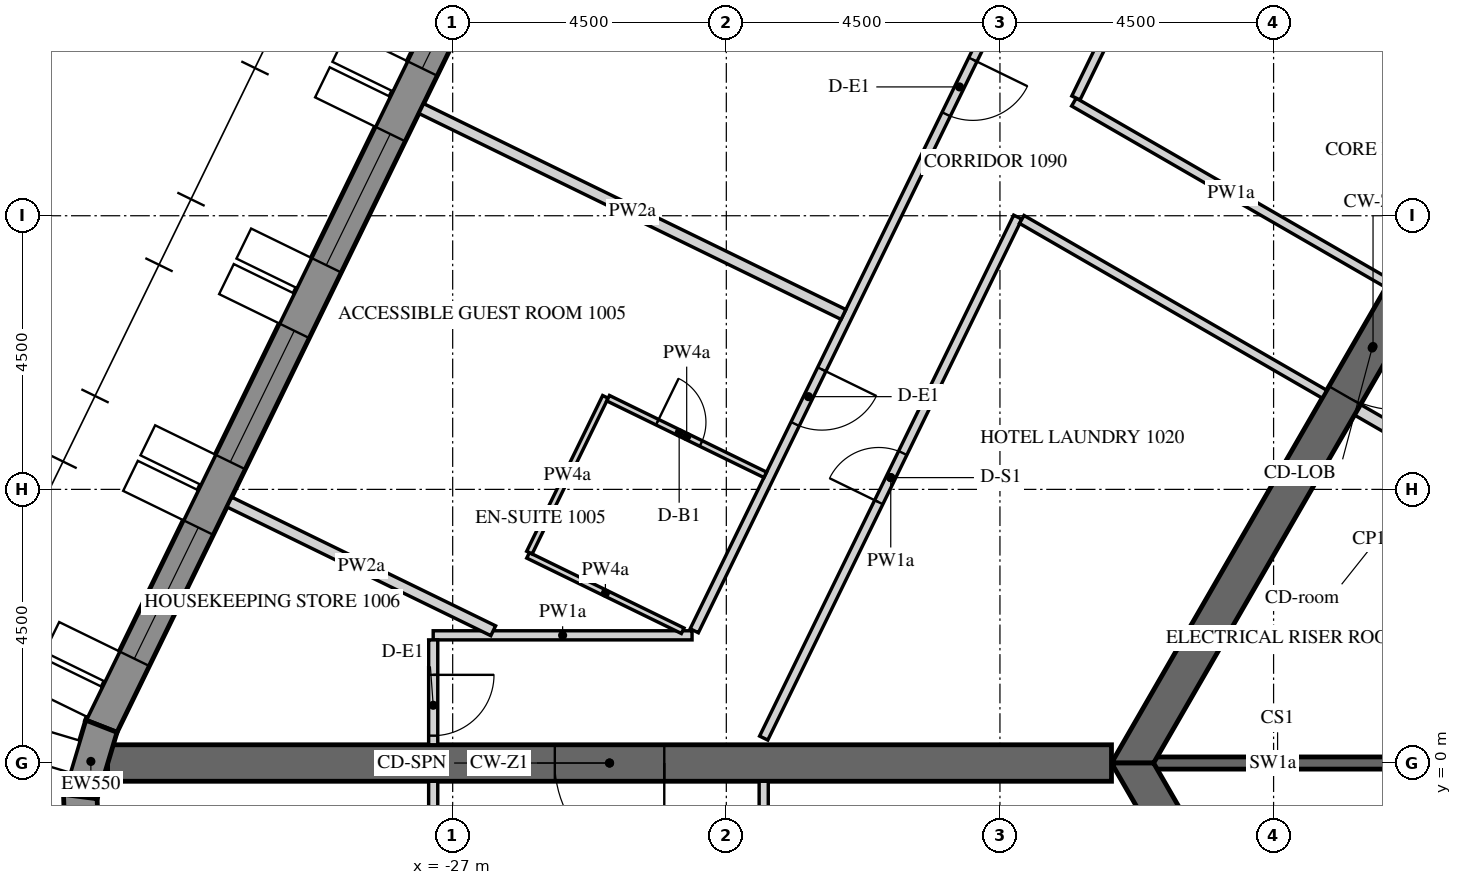
"""IFC4 building model, lengths in metres.
Left out: names, types, materials, properties, quantities, classifications, styles, units other than length and angle.
Written with IfcOpenShell. Run it as: python <this file> out.ifc"""

import sys

from ifc_helpers import new_model, si_unit, direction, frame, frame_2d, origin, place, context, subcontext, project, spatial, polyline, rectangle, outline, extrude, element, fill, save


model = new_model("IFC4")
c1 = context("Model", 3, precision=1e-05, world=origin(), true_north=direction((0.0, 1.0)))
c2 = subcontext(c1, "Body", "Model", "MODEL_VIEW")
j1 = project(units=[si_unit("LENGTHUNIT", "METRE"), si_unit("PLANEANGLEUNIT", "RADIAN")], contexts=[c1])
p1 = place(None, origin())
s1 = spatial("IfcSite", under=j1, at=p1, CompositionType="ELEMENT")
p2 = place(p1, origin())
s2 = spatial("IfcBuilding", under=s1, at=p2, CompositionType="ELEMENT")
p3 = place(p2, frame((0.0, 0.0, 135.0)))
s3 = spatial("IfcBuildingStorey", under=s2, at=p3, CompositionType="ELEMENT", Elevation=135.0)
p4 = place(p3, frame((-19.595, 27.633, -0.15), z_axis=(0.0, 0.0, 1.0), x_axis=(-0.438368285794, -0.898795441694, 0.0)))
e1 = element("IfcWall", 1, at=p4, inside=s3, PredefinedType="SOLIDWALL", context=c2, shape_type="SweptSolid", body=[
    extrude(outline(polyline([(-0.026, -0.275), (30.093, -0.275), (30.048, 0.275), (0.026, 0.275), (-0.026, -0.275)])), origin(), (0.0, 0.0, 1.0), 3.9),
])
p5 = place(p4, frame((1.236, 0.0, 1.05)))
e2 = element("IfcOpeningElement", 2, at=p5, cuts=e1, PredefinedType="OPENING", context=c2, shape_type="SweptSolid", body=[
    extrude(rectangle(XDim=2.4, YDim=2.4, at=frame_2d((1.2, 1.2))), frame((0.0, 0.285, 0.0), z_axis=(0.0, -1.0, 0.0), x_axis=(1.0, 0.0, 0.0)), (0.0, 0.0, 1.0), 0.57),
])
p6 = place(p4, frame((4.835, 0.0, 1.05)))
e3 = element("IfcOpeningElement", 3, at=p6, cuts=e1, PredefinedType="OPENING", context=c2, shape_type="SweptSolid", body=[
    extrude(rectangle(XDim=2.4, YDim=2.4, at=frame_2d((1.2, 1.2))), frame((0.0, 0.285, 0.0), z_axis=(0.0, -1.0, 0.0), x_axis=(1.0, 0.0, 0.0)), (0.0, 0.0, 1.0), 0.57),
])
p7 = place(p4, frame((8.436, 0.0, 1.05)))
e4 = element("IfcOpeningElement", 4, at=p7, cuts=e1, PredefinedType="OPENING", context=c2, shape_type="SweptSolid", body=[
    extrude(rectangle(XDim=2.4, YDim=2.4, at=frame_2d((1.2, 1.2))), frame((0.0, 0.285, 0.0), z_axis=(0.0, -1.0, 0.0), x_axis=(1.0, 0.0, 0.0)), (0.0, 0.0, 1.0), 0.57),
])
p8 = place(p4, frame((12.035, 0.0, 1.05)))
e5 = element("IfcOpeningElement", 5, at=p8, cuts=e1, PredefinedType="OPENING", context=c2, shape_type="SweptSolid", body=[
    extrude(rectangle(XDim=2.4, YDim=2.4, at=frame_2d((1.2, 1.2))), frame((0.0, 0.285, 0.0), z_axis=(0.0, -1.0, 0.0), x_axis=(1.0, 0.0, 0.0)), (0.0, 0.0, 1.0), 0.57),
])
p9 = place(p4, frame((15.635, 0.0, 1.05)))
e6 = element("IfcOpeningElement", 6, at=p9, cuts=e1, PredefinedType="OPENING", context=c2, shape_type="SweptSolid", body=[
    extrude(rectangle(XDim=2.4, YDim=2.4, at=frame_2d((1.2, 1.2))), frame((0.0, 0.285, 0.0), z_axis=(0.0, -1.0, 0.0), x_axis=(1.0, 0.0, 0.0)), (0.0, 0.0, 1.0), 0.57),
])
p10 = place(p4, frame((19.236, 0.0, 1.05)))
e7 = element("IfcOpeningElement", 7, at=p10, cuts=e1, PredefinedType="OPENING", context=c2, shape_type="SweptSolid", body=[
    extrude(rectangle(XDim=2.4, YDim=2.4, at=frame_2d((1.2, 1.2))), frame((0.0, 0.285, 0.0), z_axis=(0.0, -1.0, 0.0), x_axis=(1.0, 0.0, 0.0)), (0.0, 0.0, 1.0), 0.57),
])
p11 = place(p4, frame((22.835, 0.0, 1.05)))
e8 = element("IfcOpeningElement", 8, at=p11, cuts=e1, PredefinedType="OPENING", context=c2, shape_type="SweptSolid", body=[
    extrude(rectangle(XDim=2.4, YDim=2.4, at=frame_2d((1.2, 1.2))), frame((0.0, 0.285, 0.0), z_axis=(0.0, -1.0, 0.0), x_axis=(1.0, 0.0, 0.0)), (0.0, 0.0, 1.0), 0.57),
])
p12 = place(p4, frame((26.436, 0.0, 1.05)))
e9 = element("IfcOpeningElement", 9, at=p12, cuts=e1, PredefinedType="OPENING", context=c2, shape_type="SweptSolid", body=[
    extrude(rectangle(XDim=2.4, YDim=2.4, at=frame_2d((1.2, 1.2))), frame((0.0, 0.285, 0.0), z_axis=(0.0, -1.0, 0.0), x_axis=(1.0, 0.0, 0.0)), (0.0, 0.0, 1.0), 0.57),
])
p13 = place(p3, frame((-32.777, 0.605, -0.15), z_axis=(0.0, 0.0, 1.0), x_axis=(-0.286921497463, -0.957954098219, 0.0)))
e10 = element("IfcWall", 10, at=p13, inside=s3, PredefinedType="SOLIDWALL", context=c2, shape_type="SweptSolid", body=[
    extrude(outline(polyline([(-0.022, -0.275), (1.253, -0.275), (1.163, 0.275), (0.022, 0.275), (-0.022, -0.275)])), origin(), (0.0, 0.0, 1.0), 3.9),
])
p14 = place(p3, frame((-33.124, -0.552, -0.15), z_axis=(0.0, 0.0, 1.0), x_axis=(0.03495638276, -0.999388838893, 0.0)))
e11 = element("IfcWall", 11, at=p14, inside=s3, PredefinedType="SOLIDWALL", context=c2, shape_type="SweptSolid", body=[
    extrude(outline(polyline([(-0.045, -0.275), (1.253, -0.275), (1.163, 0.275), (0.045, 0.275), (-0.045, -0.275)])), origin(), (0.0, 0.0, 1.0), 3.9),
])
p15 = place(p3, frame((-7.91, 13.7, -0.15), z_axis=(0.0, 0.0, 1.0), x_axis=(-0.499999880136, -0.866025472988, 0.0)))
e12 = element("IfcWall", 12, at=p15, inside=s3, PredefinedType="SHEAR", context=c2, shape_type="SweptSolid", body=[
    extrude(outline(polyline([(-0.173, -0.3), (15.993, -0.3), (15.646, 0.3), (0.173, 0.3), (-0.173, -0.3)])), origin(), (0.0, 0.0, 1.0), 3.9),
])
p16 = place(p15, frame((7.039, 0.0, 0.15)))
e13 = element("IfcOpeningElement", 13, at=p16, cuts=e12, PredefinedType="OPENING", context=c2, shape_type="SweptSolid", body=[
    extrude(rectangle(XDim=1.8, YDim=2.4, at=frame_2d((0.9, 1.2))), frame((0.0, 0.31, 0.0), z_axis=(0.0, -1.0, 0.0), x_axis=(1.0, 0.0, 0.0)), (0.0, 0.0, 1.0), 0.62),
])
p17 = place(p3, frame((-15.819, 0.0, -0.15), z_axis=(0.0, 0.0, 1.0), x_axis=(0.499999880136, -0.866025472988, 0.0)))
e14 = element("IfcWall", 14, at=p17, inside=s3, PredefinedType="SHEAR", context=c2, shape_type="SweptSolid", body=[
    extrude(outline(polyline([(-0.173, -0.3), (15.993, -0.3), (15.646, 0.3), (0.173, 0.3), (-0.173, -0.3)])), origin(), (0.0, 0.0, 1.0), 3.9),
])
p18 = place(p17, frame((6.981, 0.0, 0.15)))
e15 = element("IfcOpeningElement", 15, at=p18, cuts=e14, PredefinedType="OPENING", context=c2, shape_type="SweptSolid", body=[
    extrude(rectangle(XDim=1.8, YDim=2.4, at=frame_2d((0.9, 1.2))), frame((0.0, 0.31, 0.0), z_axis=(0.0, -1.0, 0.0), x_axis=(1.0, 0.0, 0.0)), (0.0, 0.0, 1.0), 0.62),
])
p19 = place(p3, frame((-16.166, 0.0, -0.15), z_axis=(0.0, 0.0, 1.0), x_axis=(-1.0, 0.0, 0.0)))
e16 = element("IfcWall", 16, at=p19, inside=s3, PredefinedType="SHEAR", context=c2, shape_type="SweptSolid", body=[
    extrude(rectangle(XDim=16.509, YDim=0.6, at=frame_2d((8.254, 0.0))), origin(), (0.0, 0.0, 1.0), 3.9),
])
p20 = place(p19, frame((7.354, 0.0, 0.15)))
e17 = element("IfcOpeningElement", 17, at=p20, cuts=e16, PredefinedType="OPENING", context=c2, shape_type="SweptSolid", body=[
    extrude(rectangle(XDim=1.8, YDim=2.4, at=frame_2d((0.9, 1.2))), frame((0.0, 0.31, 0.0), z_axis=(0.0, -1.0, 0.0), x_axis=(1.0, 0.0, 0.0)), (0.0, 0.0, 1.0), 0.62),
])
p21 = place(p3, frame((-11.547, 0.0, -0.15), z_axis=(0.0, 0.0, 1.0), x_axis=(-1.0, 0.0, 0.0)))
e18 = element("IfcWall", 18, at=p21, inside=s3, PredefinedType="SHEAR", context=c2, shape_type="SweptSolid", body=[
    extrude(rectangle(XDim=3.926, YDim=0.2, at=frame_2d((1.963, 0.0))), origin(), (0.0, 0.0, 1.0), 3.9),
])
p22 = place(p3, frame((-9.175, 4.109, 0.0), z_axis=(0.0, 0.0, 1.0), x_axis=(-0.865989465428, 0.500062241894, 0.0)))
e19 = element("IfcWall", 19, at=p22, inside=s3, PredefinedType="PARTITIONING", context=c2, shape_type="SweptSolid", body=[
    extrude(rectangle(XDim=3.4, YDim=0.2, at=frame_2d((1.7, 0.0))), origin(), (0.0, 0.0, 1.0), 3.65),
])
p23 = place(p22, frame((1.351, 0.0, 0.0)))
e20 = element("IfcOpeningElement", 20, at=p23, cuts=e19, PredefinedType="OPENING", context=c2, shape_type="SweptSolid", body=[
    extrude(rectangle(XDim=0.9, YDim=2.1, at=frame_2d((0.45, 1.05))), frame((0.0, 0.11, 0.0), z_axis=(0.0, -1.0, 0.0), x_axis=(1.0, 0.0, 0.0)), (0.0, 0.0, 1.0), 0.22),
])
p24 = place(p3, frame((-13.565, 21.575, 0.0), z_axis=(0.0, 0.0, 1.0), x_axis=(-0.438378393111, -0.898790511996, 0.0)))
e21 = element("IfcWall", 21, at=p24, inside=s3, PredefinedType="PARTITIONING", context=c2, shape_type="SweptSolid", body=[
    extrude(rectangle(XDim=21.584, YDim=0.15, at=frame_2d((10.792, 0.0))), origin(), (0.0, 0.0, 1.0), 2.838),
])
p25 = place(p24, frame((0.775, 0.0, 0.0)))
e22 = element("IfcOpeningElement", 22, at=p25, cuts=e21, PredefinedType="OPENING", context=c2, shape_type="SweptSolid", body=[
    extrude(rectangle(XDim=1.0, YDim=2.1, at=frame_2d((0.5, 1.05))), frame((0.0, 0.085, 0.0), z_axis=(0.0, -1.0, 0.0), x_axis=(1.0, 0.0, 0.0)), (0.0, 0.0, 1.0), 0.17),
])
p26 = place(p24, frame((11.134, 0.0, 0.0)))
e23 = element("IfcOpeningElement", 23, at=p26, cuts=e21, PredefinedType="OPENING", context=c2, shape_type="SweptSolid", body=[
    extrude(rectangle(XDim=1.0, YDim=2.1, at=frame_2d((0.5, 1.05))), frame((0.0, 0.085, 0.0), z_axis=(0.0, -1.0, 0.0), x_axis=(1.0, 0.0, 0.0)), (0.0, 0.0, 1.0), 0.17),
])
p27 = place(p24, frame((16.801, 0.0, 0.0)))
e24 = element("IfcOpeningElement", 24, at=p27, cuts=e21, PredefinedType="OPENING", context=c2, shape_type="SweptSolid", body=[
    extrude(rectangle(XDim=1.0, YDim=2.1, at=frame_2d((0.5, 1.05))), frame((0.0, 0.085, 0.0), z_axis=(0.0, -1.0, 0.0), x_axis=(1.0, 0.0, 0.0)), (0.0, 0.0, 1.0), 0.17),
])
p28 = place(p3, frame((-23.063, 2.1, 0.0), z_axis=(0.0, 0.0, 1.0), x_axis=(-1.0, 0.0, 0.0)))
e25 = element("IfcWall", 25, at=p28, inside=s3, PredefinedType="PARTITIONING", context=c2, shape_type="SweptSolid", body=[
    extrude(rectangle(XDim=4.257, YDim=0.15, at=frame_2d((2.128, 0.0))), origin(), (0.0, 0.0, 1.0), 2.838),
])
p29 = place(p3, frame((-27.32, 2.025, 0.0), z_axis=(0.0, 0.0, 1.0), x_axis=(0.0, -1.0, 0.0)))
e26 = element("IfcWall", 26, at=p29, inside=s3, PredefinedType="PARTITIONING", context=c2, shape_type="SweptSolid", body=[
    extrude(rectangle(XDim=1.725, YDim=0.15, at=frame_2d((0.862, 0.0))), origin(), (0.0, 0.0, 1.0), 2.838),
])
p30 = place(p29, frame((0.575, 0.0, 0.0)))
e27 = element("IfcOpeningElement", 27, at=p30, cuts=e26, PredefinedType="OPENING", context=c2, shape_type="SweptSolid", body=[
    extrude(rectangle(XDim=1.0, YDim=2.1, at=frame_2d((0.5, 1.05))), frame((0.0, 0.085, 0.0), z_axis=(0.0, -1.0, 0.0), x_axis=(1.0, 0.0, 0.0)), (0.0, 0.0, 1.0), 0.17),
])
p31 = place(p3, frame((-11.614, 7.884, 0.0), z_axis=(0.0, 0.0, 1.0), x_axis=(-0.866017375886, 0.50001390447, 0.0)))
e28 = element("IfcWall", 28, at=p31, inside=s3, PredefinedType="PARTITIONING", context=c2, shape_type="SweptSolid", body=[
    extrude(rectangle(XDim=5.97, YDim=0.15, at=frame_2d((2.985, 0.0))), origin(), (0.0, 0.0, 1.0), 2.838),
])
p32 = place(p3, frame((-16.751, 10.937, 0.0), z_axis=(0.0, 0.0, 1.0), x_axis=(0.438378523504, 0.898790448397, 0.0)))
e29 = element("IfcWall", 29, at=p32, inside=s3, PredefinedType="PARTITIONING", context=c2, shape_type="SweptSolid", body=[
    extrude(rectangle(XDim=9.917, YDim=0.15, at=frame_2d((4.958, 0.0))), origin(), (0.0, 0.0, 1.0), 2.838),
])
p33 = place(p3, frame((-21.885, 0.41, 0.0), z_axis=(0.0, 0.0, 1.0), x_axis=(0.43837064471, 0.898794291179, 0.0)))
e30 = element("IfcWall", 30, at=p33, inside=s3, PredefinedType="PARTITIONING", context=c2, shape_type="SweptSolid", body=[
    extrude(rectangle(XDim=9.532, YDim=0.15, at=frame_2d((4.766, 0.0))), origin(), (0.0, 0.0, 1.0), 2.838),
])
p34 = place(p33, frame((4.316, 0.0, 0.0)))
e31 = element("IfcOpeningElement", 31, at=p34, cuts=e30, PredefinedType="OPENING", context=c2, shape_type="SweptSolid", body=[
    extrude(rectangle(XDim=0.9, YDim=2.1, at=frame_2d((0.45, 1.05))), frame((0.0, 0.085, 0.0), z_axis=(0.0, -1.0, 0.0), x_axis=(1.0, 0.0, 0.0)), (0.0, 0.0, 1.0), 0.17),
])
p35 = place(p3, frame((-17.642, 8.94, 0.0), z_axis=(0.0, 0.0, 1.0), x_axis=(0.866017948234, -0.500012913169, 0.0)))
e32 = element("IfcWall", 32, at=p35, inside=s3, PredefinedType="PARTITIONING", context=c2, shape_type="SweptSolid", body=[
    extrude(rectangle(XDim=5.748, YDim=0.15, at=frame_2d((2.874, 0.0))), origin(), (0.0, 0.0, 1.0), 2.838),
])
p36 = place(p3, frame((-27.32, -0.3, 0.0), z_axis=(0.0, 0.0, 1.0), x_axis=(0.0, -1.0, 0.0)))
e33 = element("IfcWall", 33, at=p36, inside=s3, PredefinedType="PARTITIONING", context=c2, shape_type="SweptSolid", body=[
    extrude(rectangle(XDim=1.8, YDim=0.15, at=frame_2d((0.9, 0.0))), origin(), (0.0, 0.0, 1.0), 2.838),
])
p37 = place(p3, frame((-21.885, -1.644, 0.0), z_axis=(0.0, 0.0, 1.0), x_axis=(0.0, 1.0, 0.0)))
e34 = element("IfcWall", 34, at=p37, inside=s3, PredefinedType="PARTITIONING", context=c2, shape_type="SweptSolid", body=[
    extrude(rectangle(XDim=1.344, YDim=0.15, at=frame_2d((0.672, 0.0))), origin(), (0.0, 0.0, 1.0), 2.838),
])
p38 = place(p3, frame((-27.517, 10.763, 0.0), z_axis=(0.0, 0.0, 1.0), x_axis=(0.898789402655, -0.438380667542, 0.0)))
e35 = element("IfcWall", 35, at=p38, inside=s3, PredefinedType="PARTITIONING", context=c2, shape_type="SweptSolid", body=[
    extrude(rectangle(XDim=7.725, YDim=0.18, at=frame_2d((3.862, 0.0))), origin(), (0.0, 0.0, 1.0), 2.838),
])
p39 = place(p3, frame((-23.217, 2.175, 0.0), z_axis=(0.0, 0.0, 1.0), x_axis=(-0.89881903386, 0.438319910991, 0.0)))
e36 = element("IfcWall", 36, at=p39, inside=s3, PredefinedType="PARTITIONING", context=c2, shape_type="SweptSolid", body=[
    extrude(rectangle(XDim=2.829, YDim=0.1, at=frame_2d((1.415, 0.0))), origin(), (0.0, 0.0, 1.0), 2.838),
])
p40 = place(p3, frame((-25.738, 3.46, 0.0), z_axis=(0.0, 0.0, 1.0), x_axis=(0.438317306369, 0.898820304031, 0.0)))
e37 = element("IfcWall", 37, at=p40, inside=s3, PredefinedType="PARTITIONING", context=c2, shape_type="SweptSolid", body=[
    extrude(rectangle(XDim=2.85, YDim=0.1, at=frame_2d((1.425, 0.0))), origin(), (0.0, 0.0, 1.0), 2.838),
])
p41 = place(p3, frame((-24.444, 6.0, 0.0), z_axis=(0.0, 0.0, 1.0), x_axis=(0.898782318197, -0.438395192145, 0.0)))
e38 = element("IfcWall", 38, at=p41, inside=s3, PredefinedType="PARTITIONING", context=c2, shape_type="SweptSolid", body=[
    extrude(rectangle(XDim=2.875, YDim=0.1, at=frame_2d((1.438, 0.0))), origin(), (0.0, 0.0, 1.0), 2.838),
])
p42 = place(p41, frame((0.9, 0.0, 0.0)))
e39 = element("IfcOpeningElement", 39, at=p42, cuts=e38, PredefinedType="OPENING", context=c2, shape_type="SweptSolid", body=[
    extrude(rectangle(XDim=0.8, YDim=2.1, at=frame_2d((0.4, 1.05))), frame((0.0, 0.06, 0.0), z_axis=(0.0, -1.0, 0.0), x_axis=(1.0, 0.0, 0.0)), (0.0, 0.0, 1.0), 0.12),
])
p43 = place(p3, frame((-30.673, 4.292, 0.0), z_axis=(0.0, 0.0, 1.0), x_axis=(0.898812662672, -0.438332975512, 0.0)))
e40 = element("IfcWall", 40, at=p43, inside=s3, PredefinedType="PARTITIONING", context=c2, shape_type="SweptSolid", body=[
    extrude(rectangle(XDim=4.828, YDim=0.18, at=frame_2d((2.414, 0.0))), origin(), (0.0, 0.0, 1.0), 2.838),
])
p44 = place(p9, frame((0.0, 0.205, 0.0)))
e41 = element("IfcWindow", 41, at=p44, inside=s3, PartitioningType="DOUBLE_PANEL_VERTICAL", PredefinedType="WINDOW", context=c2, shape_type="SweptSolid", body=[
    extrude(rectangle(XDim=2.4, YDim=2.4, at=frame_2d((1.2, 1.2))), frame((0.0, 0.03, 0.0), z_axis=(0.0, -1.0, 0.0), x_axis=(1.0, 0.0, 0.0)), (0.0, 0.0, 1.0), 0.06),
])
fill(e6, e41)
p45 = place(p10, frame((0.0, 0.205, 0.0)))
e42 = element("IfcWindow", 42, at=p45, inside=s3, PartitioningType="DOUBLE_PANEL_VERTICAL", PredefinedType="WINDOW", context=c2, shape_type="SweptSolid", body=[
    extrude(rectangle(XDim=2.4, YDim=2.4, at=frame_2d((1.2, 1.2))), frame((0.0, 0.03, 0.0), z_axis=(0.0, -1.0, 0.0), x_axis=(1.0, 0.0, 0.0)), (0.0, 0.0, 1.0), 0.06),
])
fill(e7, e42)
p46 = place(p11, frame((0.0, 0.205, 0.0)))
e43 = element("IfcWindow", 43, at=p46, inside=s3, PartitioningType="DOUBLE_PANEL_VERTICAL", PredefinedType="WINDOW", context=c2, shape_type="SweptSolid", body=[
    extrude(rectangle(XDim=2.4, YDim=2.4, at=frame_2d((1.2, 1.2))), frame((0.0, 0.03, 0.0), z_axis=(0.0, -1.0, 0.0), x_axis=(1.0, 0.0, 0.0)), (0.0, 0.0, 1.0), 0.06),
])
fill(e8, e43)
p47 = place(p12, frame((0.0, 0.205, 0.0)))
e44 = element("IfcWindow", 44, at=p47, inside=s3, PartitioningType="DOUBLE_PANEL_VERTICAL", PredefinedType="WINDOW", context=c2, shape_type="SweptSolid", body=[
    extrude(rectangle(XDim=2.4, YDim=2.4, at=frame_2d((1.2, 1.2))), frame((0.0, 0.03, 0.0), z_axis=(0.0, -1.0, 0.0), x_axis=(1.0, 0.0, 0.0)), (0.0, 0.0, 1.0), 0.06),
])
fill(e9, e44)
p48 = place(p16, origin())
e45 = element("IfcDoor", 45, at=p48, inside=s3, OperationType="DOUBLE_DOOR_SINGLE_SWING", PredefinedType="DOOR", context=c2, shape_type="SweptSolid", body=[
    extrude(rectangle(XDim=1.8, YDim=2.4, at=frame_2d((0.9, 1.2))), frame((0.0, 0.025, 0.0), z_axis=(0.0, -1.0, 0.0), x_axis=(1.0, 0.0, 0.0)), (0.0, 0.0, 1.0), 0.05),
])
fill(e13, e45)
p49 = place(p20, origin())
e46 = element("IfcDoor", 46, at=p49, inside=s3, OperationType="DOUBLE_DOOR_SINGLE_SWING", PredefinedType="DOOR", context=c2, shape_type="SweptSolid", body=[
    extrude(rectangle(XDim=1.8, YDim=2.4, at=frame_2d((0.9, 1.2))), frame((0.0, 0.025, 0.0), z_axis=(0.0, -1.0, 0.0), x_axis=(1.0, 0.0, 0.0)), (0.0, 0.0, 1.0), 0.05),
])
fill(e17, e46)
p50 = place(p26, origin())
e47 = element("IfcDoor", 47, at=p50, inside=s3, OperationType="SINGLE_SWING_LEFT", PredefinedType="DOOR", context=c2, shape_type="SweptSolid", body=[
    extrude(rectangle(XDim=1.0, YDim=2.1, at=frame_2d((0.5, 1.05))), frame((0.0, 0.025, 0.0), z_axis=(0.0, -1.0, 0.0), x_axis=(1.0, 0.0, 0.0)), (0.0, 0.0, 1.0), 0.05),
])
fill(e23, e47)
p51 = place(p27, origin())
e48 = element("IfcDoor", 48, at=p51, inside=s3, OperationType="SINGLE_SWING_RIGHT", PredefinedType="DOOR", context=c2, shape_type="SweptSolid", body=[
    extrude(rectangle(XDim=1.0, YDim=2.1, at=frame_2d((0.5, 1.05))), frame((0.0, 0.025, 0.0), z_axis=(0.0, -1.0, 0.0), x_axis=(1.0, 0.0, 0.0)), (0.0, 0.0, 1.0), 0.05),
])
fill(e24, e48)
p52 = place(p42, origin())
e49 = element("IfcDoor", 49, at=p52, inside=s3, OperationType="SINGLE_SWING_RIGHT", PredefinedType="DOOR", context=c2, shape_type="SweptSolid", body=[
    extrude(rectangle(XDim=0.8, YDim=2.1, at=frame_2d((0.4, 1.05))), frame((0.0, 0.025, 0.0), z_axis=(0.0, -1.0, 0.0), x_axis=(1.0, 0.0, 0.0)), (0.0, 0.0, 1.0), 0.05),
])
fill(e39, e49)
p53 = place(p30, origin())
e50 = element("IfcDoor", 50, at=p53, inside=s3, OperationType="SINGLE_SWING_LEFT", PredefinedType="DOOR", context=c2, shape_type="SweptSolid", body=[
    extrude(rectangle(XDim=1.0, YDim=2.1, at=frame_2d((0.5, 1.05))), frame((0.0, 0.025, 0.0), z_axis=(0.0, -1.0, 0.0), x_axis=(1.0, 0.0, 0.0)), (0.0, 0.0, 1.0), 0.05),
])
fill(e27, e50)
p54 = place(p34, origin())
e51 = element("IfcDoor", 51, at=p54, inside=s3, OperationType="SINGLE_SWING_RIGHT", PredefinedType="DOOR", context=c2, shape_type="SweptSolid", body=[
    extrude(rectangle(XDim=0.9, YDim=2.1, at=frame_2d((0.45, 1.05))), frame((0.0, 0.025, 0.0), z_axis=(0.0, -1.0, 0.0), x_axis=(1.0, 0.0, 0.0)), (0.0, 0.0, 1.0), 0.05),
])
fill(e31, e51)
save(model, sys.argv[1])
